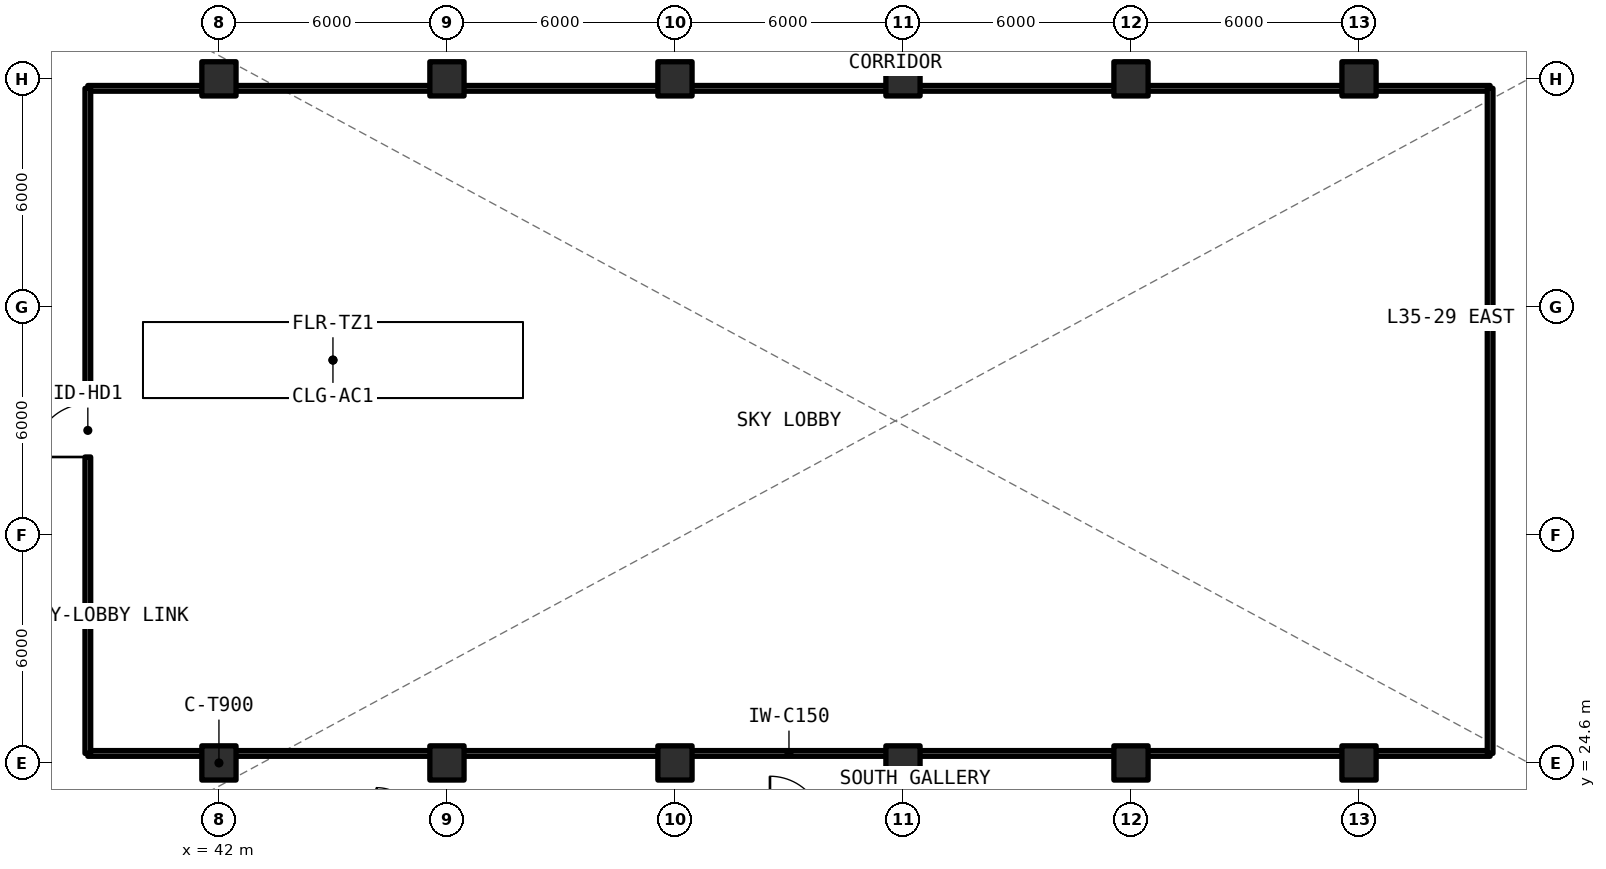
"""IFC4 building model, lengths in metres.
Left out: names, types, materials, properties, quantities, classifications, styles, units other than length and angle.
Written with IfcOpenShell. Run it as: python <this file> out.ifc"""

import sys

from ifc_helpers import new_model, si_unit, direction, frame, frame_2d, origin, origin_2d, place, context, subcontext, project, spatial, rectangle, extrude, element, fill, save


model = new_model("IFC4")
c1 = context("Model", 3, precision=1e-05, world=origin(), true_north=direction((0.0, 1.0)))
c2 = subcontext(c1, "Body", "Model", "MODEL_VIEW")
j1 = project(units=[si_unit("LENGTHUNIT", "METRE"), si_unit("PLANEANGLEUNIT", "RADIAN")], contexts=[c1])
p1 = place(None, origin())
s1 = spatial("IfcSite", under=j1, at=p1, CompositionType="ELEMENT")
p2 = place(p1, origin())
s2 = spatial("IfcBuilding", under=s1, at=p2, CompositionType="ELEMENT")
p3 = place(p2, frame((0.0, 0.0, 128.04)))
s3 = spatial("IfcBuildingStorey", under=s2, at=p3, CompositionType="ELEMENT", Elevation=128.04)
for number, where, z_axis, x_axis in (
    (1, (42.0, 24.6, 0.0), (0.0, 0.0, 1.0), (1.0, 0.0, 0.0)),
    (2, (42.0, 42.6, 0.0), (0.0, 0.0, 1.0), (1.0, 0.0, 0.0)),
    (3, (48.0, 24.6, 0.0), (0.0, 0.0, 1.0), (1.0, 0.0, 0.0)),
    (4, (48.0, 42.6, 0.0), (0.0, 0.0, 1.0), (1.0, 0.0, 0.0)),
    (5, (54.0, 24.6, 0.0), (0.0, 0.0, 1.0), (1.0, 0.0, 0.0)),
    (6, (54.0, 42.6, 0.0), (0.0, 0.0, 1.0), (1.0, 0.0, 0.0)),
    (7, (60.0, 24.6, 0.0), (0.0, 0.0, 1.0), (1.0, 0.0, 0.0)),
    (8, (60.0, 42.6, 0.0), (0.0, 0.0, 1.0), (1.0, 0.0, 0.0)),
    (9, (66.0, 24.6, 0.0), (0.0, 0.0, 1.0), (1.0, 0.0, 0.0)),
    (10, (66.0, 42.6, 0.0), (0.0, 0.0, 1.0), (1.0, 0.0, 0.0)),
    (11, (72.0, 24.6, 0.0), (0.0, 0.0, 1.0), (1.0, 0.0, 0.0)),
    (12, (72.0, 42.6, 0.0), (0.0, 0.0, 1.0), (1.0, 0.0, 0.0)),
):
    element("IfcColumn", number, at=place(p3, frame(where, z_axis=z_axis, x_axis=x_axis)), inside=s3, PredefinedType="COLUMN", context=c2, shape_type="SweptSolid", body=[
        extrude(rectangle(XDim=0.9, YDim=0.9, at=origin_2d()), origin(), (0.0, 0.0, 1.0), 3.96),
    ])
for number, where, z_axis, x_axis in (
    (13, (38.55, 24.85, 0.0), (0.0, 0.0, 1.0), (1.0, 0.0, 0.0)),
    (14, (38.55, 42.35, 0.0), (0.0, 0.0, 1.0), (1.0, 0.0, 0.0)),
):
    element("IfcWall", number, at=place(p3, frame(where, z_axis=z_axis, x_axis=x_axis)), inside=s3, PredefinedType="SOLIDWALL", context=c2, shape_type="SweptSolid", body=[
        extrude(rectangle(XDim=36.9, YDim=0.15, at=frame_2d((18.45, 0.0))), origin(), (0.0, 0.0, 1.0), 2.96),
    ])
p4 = place(p3, frame((38.55, 24.85, 0.0), z_axis=(0.0, 0.0, 1.0), x_axis=(0.0, 1.0, 0.0)))
e15 = element("IfcWall", 15, at=p4, inside=s3, PredefinedType="SOLIDWALL", context=c2, shape_type="SweptSolid", body=[
    extrude(rectangle(XDim=17.5, YDim=0.15, at=frame_2d((8.75, 0.0))), origin(), (0.0, 0.0, 1.0), 2.96),
])
p5 = place(p4, frame((7.8, 0.0, 0.0)))
e16 = element("IfcOpeningElement", 16, at=p5, cuts=e15, PredefinedType="OPENING", context=c2, shape_type="SweptSolid", body=[
    extrude(rectangle(XDim=1.4, YDim=2.15, at=frame_2d((0.7, 1.075))), frame((0.0, 0.085, 0.0), z_axis=(0.0, -1.0, 0.0), x_axis=(1.0, 0.0, 0.0)), (0.0, 0.0, 1.0), 0.17),
])
p6 = place(p3, frame((75.45, 24.85, 0.0), z_axis=(0.0, 0.0, 1.0), x_axis=(0.0, 1.0, 0.0)))
e17 = element("IfcWall", 17, at=p6, inside=s3, PredefinedType="SOLIDWALL", context=c2, shape_type="SweptSolid", body=[
    extrude(rectangle(XDim=17.5, YDim=0.15, at=frame_2d((8.75, 0.0))), origin(), (0.0, 0.0, 1.0), 2.96),
])
p7 = place(p5, origin())
e18 = element("IfcDoor", 18, at=p7, inside=s3, OperationType="SINGLE_SWING_LEFT", PredefinedType="DOOR", context=c2, shape_type="SweptSolid", body=[
    extrude(rectangle(XDim=1.4, YDim=2.15, at=frame_2d((0.7, 1.075))), frame((0.0, 0.025, 0.0), z_axis=(0.0, -1.0, 0.0), x_axis=(1.0, 0.0, 0.0)), (0.0, 0.0, 1.0), 0.05),
])
fill(e16, e18)
save(model, sys.argv[1])
